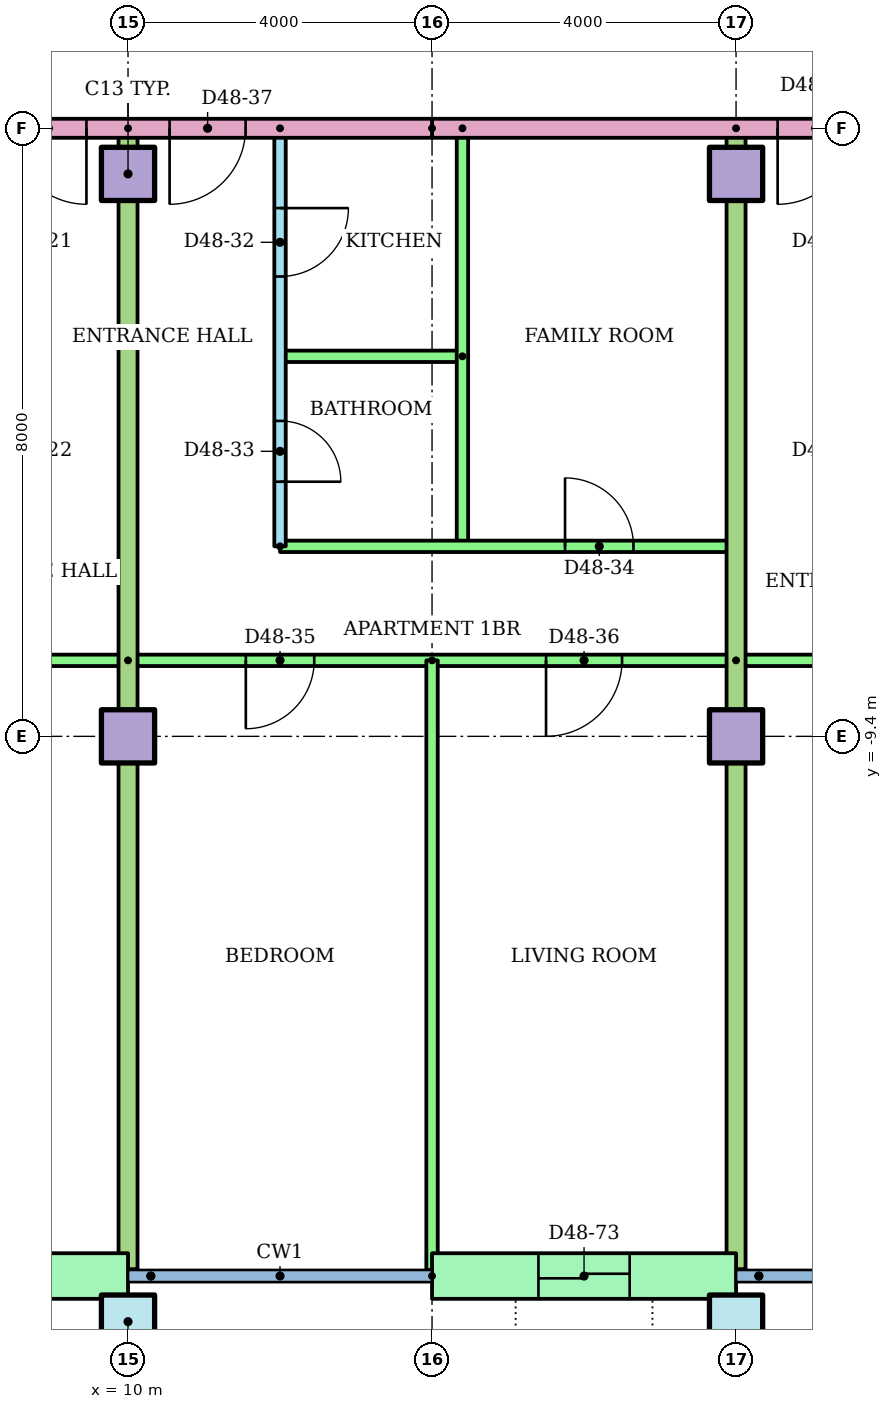
"""IFC4 building model, lengths in metres.
Left out: names, types, materials, properties, quantities, classifications, styles, units other than length and angle.
Written with IfcOpenShell. Run it as: python <this file> out.ifc"""

import sys

from ifc_helpers import new_model, si_unit, direction, frame, frame_2d, origin, origin_2d, place, context, subcontext, project, spatial, rectangle, hollow_rectangle, extrude, element, fill, save


model = new_model("IFC4")
c1 = context("Model", 3, precision=1e-05, world=origin(), true_north=direction((0.0, 1.0)))
c2 = subcontext(c1, "Body", "Model", "MODEL_VIEW")
j1 = project(units=[si_unit("LENGTHUNIT", "METRE"), si_unit("PLANEANGLEUNIT", "RADIAN")], contexts=[c1])
p1 = place(None, origin())
s1 = spatial("IfcSite", under=j1, at=p1, CompositionType="ELEMENT")
p2 = place(p1, origin())
s2 = spatial("IfcBuilding", under=s1, at=p2, CompositionType="ELEMENT")
p3 = place(p2, frame((0.0, 0.0, 184.5)))
s3 = spatial("IfcBuildingStorey", under=s2, at=p3, CompositionType="ELEMENT", Elevation=184.5)
for number, where in (
    (1, (10.0, -17.1, 0.0)),
    (2, (18.0, -17.1, 0.0)),
):
    element("IfcColumn", number, at=place(p3, frame(where)), inside=s3, PredefinedType="COLUMN", context=c2, shape_type="SweptSolid", body=[
        extrude(hollow_rectangle(XDim=0.7, YDim=0.7, WallThickness=0.036, at=origin_2d()), origin(), (0.0, 0.0, 1.0), 3.2),
    ])
for number, where in (
    (3, (10.0, -9.4, 0.0)),
    (4, (18.0, -9.4, 0.0)),
    (5, (10.0, -2.0, 0.0)),
    (6, (18.0, -2.0, 0.0)),
):
    element("IfcColumn", number, at=place(p3, frame(where)), inside=s3, PredefinedType="COLUMN", context=c2, shape_type="SweptSolid", body=[
        extrude(rectangle(XDim=0.7, YDim=0.7, at=origin_2d()), origin(), (0.0, 0.0, 1.0), 3.2),
    ])
p4 = place(p3, frame((6.0, -16.5, 0.0)))
e7 = element("IfcWall", 7, at=p4, inside=s3, PredefinedType="STANDARD", context=c2, shape_type="SweptSolid", body=[
    extrude(rectangle(XDim=4.0, YDim=0.6, at=frame_2d((2.0, 0.0))), origin(), (0.0, 0.0, 1.0), 2.92),
])
p5 = place(p4, frame((1.4, 0.0, 0.0)))
e8 = element("IfcOpeningElement", 8, at=p5, cuts=e7, PredefinedType="OPENING", context=c2, shape_type="SweptSolid", body=[
    extrude(rectangle(XDim=1.2, YDim=2.1, at=frame_2d((0.6, 1.05))), frame((0.0, 0.31, 0.0), z_axis=(0.0, -1.0, 0.0), x_axis=(1.0, 0.0, 0.0)), (0.0, 0.0, 1.0), 0.62),
])
p6 = place(p3, frame((14.0, -16.5, 0.0)))
e9 = element("IfcWall", 9, at=p6, inside=s3, PredefinedType="STANDARD", context=c2, shape_type="SweptSolid", body=[
    extrude(rectangle(XDim=4.0, YDim=0.6, at=frame_2d((2.0, 0.0))), origin(), (0.0, 0.0, 1.0), 2.92),
])
p7 = place(p6, frame((1.4, 0.0, 0.0)))
e10 = element("IfcOpeningElement", 10, at=p7, cuts=e9, PredefinedType="OPENING", context=c2, shape_type="SweptSolid", body=[
    extrude(rectangle(XDim=1.2, YDim=2.1, at=frame_2d((0.6, 1.05))), frame((0.0, 0.31, 0.0), z_axis=(0.0, -1.0, 0.0), x_axis=(1.0, 0.0, 0.0)), (0.0, 0.0, 1.0), 0.62),
])
p8 = place(p3, frame((10.0, -8.4, 0.0), z_axis=(0.0, 0.0, 1.0), x_axis=(-1.0, 0.0, 0.0)))
e11 = element("IfcWall", 11, at=p8, inside=s3, PredefinedType="PARTITIONING", context=c2, shape_type="SweptSolid", body=[
    extrude(rectangle(XDim=24.0, YDim=0.15, at=frame_2d((12.0, 0.0))), origin(), (0.0, 0.0, 1.0), 2.4),
])
p9 = place(p8, frame((19.5, 0.0, 0.0)))
e12 = element("IfcOpeningElement", 12, at=p9, cuts=e11, PredefinedType="OPENING", context=c2, shape_type="SweptSolid", body=[
    extrude(rectangle(XDim=1.0, YDim=2.1, at=frame_2d((0.5, 1.05))), frame((0.0, 0.085, 0.0), z_axis=(0.0, -1.0, 0.0), x_axis=(1.0, 0.0, 0.0)), (0.0, 0.0, 1.0), 0.17),
])
p10 = place(p8, frame((13.55, 0.0, 0.0)))
e13 = element("IfcOpeningElement", 13, at=p10, cuts=e11, PredefinedType="OPENING", context=c2, shape_type="SweptSolid", body=[
    extrude(rectangle(XDim=0.9, YDim=2.1, at=frame_2d((0.45, 1.05))), frame((0.0, 0.085, 0.0), z_axis=(0.0, -1.0, 0.0), x_axis=(1.0, 0.0, 0.0)), (0.0, 0.0, 1.0), 0.17),
])
p11 = place(p8, frame((9.55, 0.0, 0.0)))
e14 = element("IfcOpeningElement", 14, at=p11, cuts=e11, PredefinedType="OPENING", context=c2, shape_type="SweptSolid", body=[
    extrude(rectangle(XDim=0.9, YDim=2.1, at=frame_2d((0.45, 1.05))), frame((0.0, 0.085, 0.0), z_axis=(0.0, -1.0, 0.0), x_axis=(1.0, 0.0, 0.0)), (0.0, 0.0, 1.0), 0.17),
])
p12 = place(p8, frame((5.55, 0.0, 0.0)))
e15 = element("IfcOpeningElement", 15, at=p12, cuts=e11, PredefinedType="OPENING", context=c2, shape_type="SweptSolid", body=[
    extrude(rectangle(XDim=0.9, YDim=2.1, at=frame_2d((0.45, 1.05))), frame((0.0, 0.085, 0.0), z_axis=(0.0, -1.0, 0.0), x_axis=(1.0, 0.0, 0.0)), (0.0, 0.0, 1.0), 0.17),
])
p13 = place(p8, frame((1.55, 0.0, 0.0)))
e16 = element("IfcOpeningElement", 16, at=p13, cuts=e11, PredefinedType="OPENING", context=c2, shape_type="SweptSolid", body=[
    extrude(rectangle(XDim=0.9, YDim=2.1, at=frame_2d((0.45, 1.05))), frame((0.0, 0.085, 0.0), z_axis=(0.0, -1.0, 0.0), x_axis=(1.0, 0.0, 0.0)), (0.0, 0.0, 1.0), 0.17),
])
p14 = place(p3, frame((12.0, -1.4, 0.0), z_axis=(0.0, 0.0, 1.0), x_axis=(0.0, -1.0, 0.0)))
e17 = element("IfcWall", 17, at=p14, inside=s3, PredefinedType="PARTITIONING", context=c2, shape_type="SweptSolid", body=[
    extrude(rectangle(XDim=5.5, YDim=0.15, at=frame_2d((2.75, 0.0))), origin(), (0.0, 0.0, 1.0), 2.4),
])
p15 = place(p14, frame((1.05, 0.0, 0.0)))
e18 = element("IfcOpeningElement", 18, at=p15, cuts=e17, PredefinedType="OPENING", context=c2, shape_type="SweptSolid", body=[
    extrude(rectangle(XDim=0.9, YDim=2.1, at=frame_2d((0.45, 1.05))), frame((0.0, 0.085, 0.0), z_axis=(0.0, -1.0, 0.0), x_axis=(1.0, 0.0, 0.0)), (0.0, 0.0, 1.0), 0.17),
])
p16 = place(p14, frame((3.85, 0.0, 0.0)))
e19 = element("IfcOpeningElement", 19, at=p16, cuts=e17, PredefinedType="OPENING", context=c2, shape_type="SweptSolid", body=[
    extrude(rectangle(XDim=0.8, YDim=2.1, at=frame_2d((0.4, 1.05))), frame((0.0, 0.085, 0.0), z_axis=(0.0, -1.0, 0.0), x_axis=(1.0, 0.0, 0.0)), (0.0, 0.0, 1.0), 0.17),
])
p17 = place(p3, frame((14.4, -4.4, 0.0), z_axis=(0.0, 0.0, 1.0), x_axis=(-1.0, 0.0, 0.0)))
e20 = element("IfcWall", 20, at=p17, inside=s3, PredefinedType="PARTITIONING", context=c2, shape_type="SweptSolid", body=[
    extrude(rectangle(XDim=2.4, YDim=0.15, at=frame_2d((1.2, 0.0))), origin(), (0.0, 0.0, 1.0), 2.4),
])
p18 = place(p3, frame((14.4, -1.4, 0.0), z_axis=(0.0, 0.0, 1.0), x_axis=(0.0, -1.0, 0.0)))
e21 = element("IfcWall", 21, at=p18, inside=s3, PredefinedType="PARTITIONING", context=c2, shape_type="SweptSolid", body=[
    extrude(rectangle(XDim=5.5, YDim=0.15, at=frame_2d((2.75, 0.0))), origin(), (0.0, 0.0, 1.0), 2.4),
])
p19 = place(p3, frame((12.0, -6.9, 0.0)))
e22 = element("IfcWall", 22, at=p19, inside=s3, PredefinedType="PARTITIONING", context=c2, shape_type="SweptSolid", body=[
    extrude(rectangle(XDim=6.0, YDim=0.15, at=frame_2d((3.0, 0.0))), origin(), (0.0, 0.0, 1.0), 2.4),
])
p20 = place(p19, frame((3.75, 0.0, 0.0)))
e23 = element("IfcOpeningElement", 23, at=p20, cuts=e22, PredefinedType="OPENING", context=c2, shape_type="SweptSolid", body=[
    extrude(rectangle(XDim=0.9, YDim=2.1, at=frame_2d((0.45, 1.05))), frame((0.0, 0.085, 0.0), z_axis=(0.0, -1.0, 0.0), x_axis=(1.0, 0.0, 0.0)), (0.0, 0.0, 1.0), 0.17),
])
p21 = place(p3, frame((18.0, -8.4, 0.0), z_axis=(0.0, 0.0, 1.0), x_axis=(-1.0, 0.0, 0.0)))
e24 = element("IfcWall", 24, at=p21, inside=s3, PredefinedType="PARTITIONING", context=c2, shape_type="SweptSolid", body=[
    extrude(rectangle(XDim=8.0, YDim=0.15, at=frame_2d((4.0, 0.0))), origin(), (0.0, 0.0, 1.0), 2.4),
])
p22 = place(p21, frame((5.55, 0.0, 0.0)))
e25 = element("IfcOpeningElement", 25, at=p22, cuts=e24, PredefinedType="OPENING", context=c2, shape_type="SweptSolid", body=[
    extrude(rectangle(XDim=0.9, YDim=2.1, at=frame_2d((0.45, 1.05))), frame((0.0, 0.085, 0.0), z_axis=(0.0, -1.0, 0.0), x_axis=(1.0, 0.0, 0.0)), (0.0, 0.0, 1.0), 0.17),
])
p23 = place(p21, frame((1.5, 0.0, 0.0)))
e26 = element("IfcOpeningElement", 26, at=p23, cuts=e24, PredefinedType="OPENING", context=c2, shape_type="SweptSolid", body=[
    extrude(rectangle(XDim=1.0, YDim=2.1, at=frame_2d((0.5, 1.05))), frame((0.0, 0.085, 0.0), z_axis=(0.0, -1.0, 0.0), x_axis=(1.0, 0.0, 0.0)), (0.0, 0.0, 1.0), 0.17),
])
p24 = place(p3, frame((14.0, -8.4, 0.0), z_axis=(0.0, 0.0, 1.0), x_axis=(0.0, -1.0, 0.0)))
e27 = element("IfcWall", 27, at=p24, inside=s3, PredefinedType="PARTITIONING", context=c2, shape_type="SweptSolid", body=[
    extrude(rectangle(XDim=8.021, YDim=0.15, at=frame_2d((4.01, 0.0))), origin(), (0.0, 0.0, 1.0), 2.4),
])
p25 = place(p3, frame((10.0, -1.4, 0.0), z_axis=(0.0, 0.0, 1.0), x_axis=(0.0, -1.0, 0.0)))
e28 = element("IfcWall", 28, at=p25, inside=s3, PredefinedType="PARTITIONING", context=c2, shape_type="SweptSolid", body=[
    extrude(rectangle(XDim=15.01, YDim=0.25, at=frame_2d((7.505, 0.0))), origin(), (0.0, 0.0, 1.0), 2.4),
])
p26 = place(p3, frame((36.82, -8.4, 0.0), z_axis=(0.0, 0.0, 1.0), x_axis=(-1.0, 0.0, 0.0)))
e29 = element("IfcWall", 29, at=p26, inside=s3, PredefinedType="PARTITIONING", context=c2, shape_type="SweptSolid", body=[
    extrude(rectangle(XDim=18.82, YDim=0.15, at=frame_2d((9.41, 0.0))), origin(), (0.0, 0.0, 1.0), 2.4),
])
p27 = place(p26, frame((14.32, 0.0, 0.0)))
e30 = element("IfcOpeningElement", 30, at=p27, cuts=e29, PredefinedType="OPENING", context=c2, shape_type="SweptSolid", body=[
    extrude(rectangle(XDim=1.0, YDim=2.1, at=frame_2d((0.5, 1.05))), frame((0.0, 0.085, 0.0), z_axis=(0.0, -1.0, 0.0), x_axis=(1.0, 0.0, 0.0)), (0.0, 0.0, 1.0), 0.17),
])
p28 = place(p26, frame((7.32, 0.0, 0.0)))
e31 = element("IfcOpeningElement", 31, at=p28, cuts=e29, PredefinedType="OPENING", context=c2, shape_type="SweptSolid", body=[
    extrude(rectangle(XDim=0.9, YDim=2.1, at=frame_2d((0.45, 1.05))), frame((0.0, 0.085, 0.0), z_axis=(0.0, -1.0, 0.0), x_axis=(1.0, 0.0, 0.0)), (0.0, 0.0, 1.0), 0.17),
])
p29 = place(p26, frame((1.373, 0.0, 0.0)))
e32 = element("IfcOpeningElement", 32, at=p29, cuts=e29, PredefinedType="OPENING", context=c2, shape_type="SweptSolid", body=[
    extrude(rectangle(XDim=0.9, YDim=2.1, at=frame_2d((0.45, 1.05))), frame((0.0, 0.085, 0.0), z_axis=(0.0, -1.0, 0.0), x_axis=(1.0, 0.0, 0.0)), (0.0, 0.0, 1.0), 0.17),
])
p30 = place(p3, frame((18.0, -1.4, 0.0), z_axis=(0.0, 0.0, 1.0), x_axis=(0.0, -1.0, 0.0)))
e33 = element("IfcWall", 33, at=p30, inside=s3, PredefinedType="PARTITIONING", context=c2, shape_type="SweptSolid", body=[
    extrude(rectangle(XDim=15.01, YDim=0.25, at=frame_2d((7.505, 0.0))), origin(), (0.0, 0.0, 1.0), 2.4),
])
p31 = place(p3, frame((29.0, -1.4, 0.0), z_axis=(0.0, 0.0, 1.0), x_axis=(-1.0, 0.0, 0.0)))
e34 = element("IfcWall", 34, at=p31, inside=s3, PredefinedType="PARTITIONING", context=c2, shape_type="SweptSolid", body=[
    extrude(rectangle(XDim=15.0, YDim=0.25, at=frame_2d((7.5, 0.0))), origin(), (0.0, 0.0, 1.0), 2.4),
])
p32 = place(p31, frame((9.453, 0.0, 0.0)))
e35 = element("IfcOpeningElement", 35, at=p32, cuts=e34, PredefinedType="OPENING", context=c2, shape_type="SweptSolid", body=[
    extrude(rectangle(XDim=1.0, YDim=2.1, at=frame_2d((0.5, 1.05))), frame((0.0, 0.135, 0.0), z_axis=(0.0, -1.0, 0.0), x_axis=(1.0, 0.0, 0.0)), (0.0, 0.0, 1.0), 0.27),
])
p33 = place(p3, frame((14.0, -1.4, 0.0), z_axis=(0.0, 0.0, 1.0), x_axis=(-1.0, 0.0, 0.0)))
e36 = element("IfcWall", 36, at=p33, inside=s3, PredefinedType="PARTITIONING", context=c2, shape_type="SweptSolid", body=[
    extrude(rectangle(XDim=28.0, YDim=0.25, at=frame_2d((14.0, 0.0))), origin(), (0.0, 0.0, 1.0), 2.4),
])
p34 = place(p33, frame((4.547, 0.0, 0.0)))
e37 = element("IfcOpeningElement", 37, at=p34, cuts=e36, PredefinedType="OPENING", context=c2, shape_type="SweptSolid", body=[
    extrude(rectangle(XDim=1.0, YDim=2.1, at=frame_2d((0.5, 1.05))), frame((0.0, 0.135, 0.0), z_axis=(0.0, -1.0, 0.0), x_axis=(1.0, 0.0, 0.0)), (0.0, 0.0, 1.0), 0.27),
])
p35 = place(p33, frame((2.453, 0.0, 0.0)))
e38 = element("IfcOpeningElement", 38, at=p35, cuts=e36, PredefinedType="OPENING", context=c2, shape_type="SweptSolid", body=[
    extrude(rectangle(XDim=1.0, YDim=2.1, at=frame_2d((0.5, 1.05))), frame((0.0, 0.135, 0.0), z_axis=(0.0, -1.0, 0.0), x_axis=(1.0, 0.0, 0.0)), (0.0, 0.0, 1.0), 0.27),
])
p36 = place(p34, origin())
e39 = element("IfcDoor", 39, at=p36, inside=s3, OperationType="SINGLE_SWING_LEFT", PredefinedType="DOOR", context=c2, shape_type="SweptSolid", body=[
    extrude(rectangle(XDim=1.0, YDim=2.1, at=frame_2d((0.5, 1.05))), frame((0.0, 0.025, 0.0), z_axis=(0.0, -1.0, 0.0), x_axis=(1.0, 0.0, 0.0)), (0.0, 0.0, 1.0), 0.05),
])
fill(e37, e39)
p37 = place(p15, origin())
e40 = element("IfcDoor", 40, at=p37, inside=s3, OperationType="SINGLE_SWING_LEFT", PredefinedType="DOOR", context=c2, shape_type="SweptSolid", body=[
    extrude(rectangle(XDim=0.9, YDim=2.1, at=frame_2d((0.45, 1.05))), frame((0.0, 0.025, 0.0), z_axis=(0.0, -1.0, 0.0), x_axis=(1.0, 0.0, 0.0)), (0.0, 0.0, 1.0), 0.05),
])
fill(e18, e40)
p38 = place(p16, origin())
e41 = element("IfcDoor", 41, at=p38, inside=s3, OperationType="SINGLE_SWING_RIGHT", PredefinedType="DOOR", context=c2, shape_type="SweptSolid", body=[
    extrude(rectangle(XDim=0.8, YDim=2.1, at=frame_2d((0.4, 1.05))), frame((0.0, 0.025, 0.0), z_axis=(0.0, -1.0, 0.0), x_axis=(1.0, 0.0, 0.0)), (0.0, 0.0, 1.0), 0.05),
])
fill(e19, e41)
p39 = place(p20, origin())
e42 = element("IfcDoor", 42, at=p39, inside=s3, OperationType="SINGLE_SWING_LEFT", PredefinedType="DOOR", context=c2, shape_type="SweptSolid", body=[
    extrude(rectangle(XDim=0.9, YDim=2.1, at=frame_2d((0.45, 1.05))), frame((0.0, 0.025, 0.0), z_axis=(0.0, -1.0, 0.0), x_axis=(1.0, 0.0, 0.0)), (0.0, 0.0, 1.0), 0.05),
])
fill(e23, e42)
p40 = place(p22, origin())
e43 = element("IfcDoor", 43, at=p40, inside=s3, OperationType="SINGLE_SWING_RIGHT", PredefinedType="DOOR", context=c2, shape_type="SweptSolid", body=[
    extrude(rectangle(XDim=0.9, YDim=2.1, at=frame_2d((0.45, 1.05))), frame((0.0, 0.025, 0.0), z_axis=(0.0, -1.0, 0.0), x_axis=(1.0, 0.0, 0.0)), (0.0, 0.0, 1.0), 0.05),
])
fill(e25, e43)
p41 = place(p23, origin())
e44 = element("IfcDoor", 44, at=p41, inside=s3, OperationType="SINGLE_SWING_RIGHT", PredefinedType="DOOR", context=c2, shape_type="SweptSolid", body=[
    extrude(rectangle(XDim=1.0, YDim=2.1, at=frame_2d((0.5, 1.05))), frame((0.0, 0.025, 0.0), z_axis=(0.0, -1.0, 0.0), x_axis=(1.0, 0.0, 0.0)), (0.0, 0.0, 1.0), 0.05),
])
fill(e26, e44)
p42 = place(p35, origin())
e45 = element("IfcDoor", 45, at=p42, inside=s3, OperationType="SINGLE_SWING_RIGHT", PredefinedType="DOOR", context=c2, shape_type="SweptSolid", body=[
    extrude(rectangle(XDim=1.0, YDim=2.1, at=frame_2d((0.5, 1.05))), frame((0.0, 0.025, 0.0), z_axis=(0.0, -1.0, 0.0), x_axis=(1.0, 0.0, 0.0)), (0.0, 0.0, 1.0), 0.05),
])
fill(e38, e45)
p43 = place(p32, origin())
e46 = element("IfcDoor", 46, at=p43, inside=s3, OperationType="SINGLE_SWING_RIGHT", PredefinedType="DOOR", context=c2, shape_type="SweptSolid", body=[
    extrude(rectangle(XDim=1.0, YDim=2.1, at=frame_2d((0.5, 1.05))), frame((0.0, 0.025, 0.0), z_axis=(0.0, -1.0, 0.0), x_axis=(1.0, 0.0, 0.0)), (0.0, 0.0, 1.0), 0.05),
])
fill(e35, e46)
p44 = place(p7, origin())
e47 = element("IfcDoor", 47, at=p44, inside=s3, OperationType="SLIDING_TO_LEFT", PredefinedType="DOOR", context=c2, shape_type="SweptSolid", body=[
    extrude(rectangle(XDim=1.2, YDim=2.1, at=frame_2d((0.6, 1.05))), frame((0.0, 0.025, 0.0), z_axis=(0.0, -1.0, 0.0), x_axis=(1.0, 0.0, 0.0)), (0.0, 0.0, 1.0), 0.05),
])
fill(e10, e47)
save(model, sys.argv[1])
